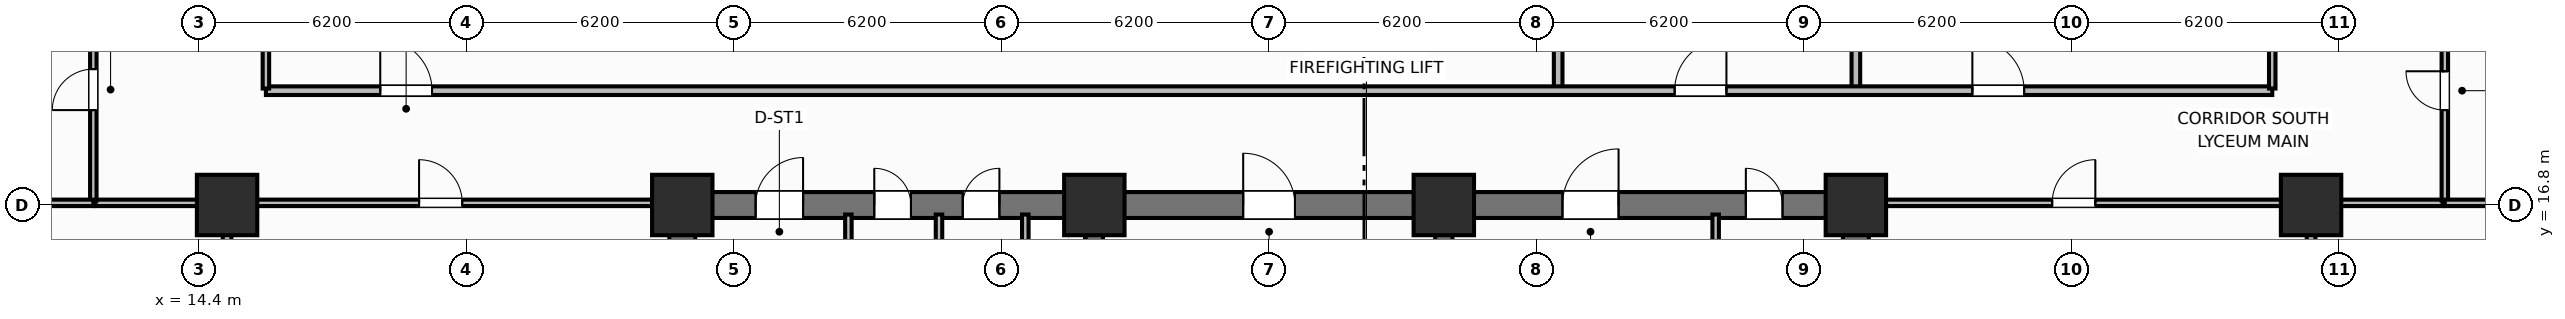
"""IFC4 building model, lengths in metres.
Left out: names, types, materials, properties, quantities, classifications, styles, units other than length and angle.
Written with IfcOpenShell. Run it as: python <this file> out.ifc"""

import sys

from ifc_helpers import new_model, si_unit, direction, frame, frame_2d, origin, origin_2d, place, context, subcontext, project, spatial, rectangle, extrude, element, fill, save


model = new_model("IFC4")
c1 = context("Model", 3, precision=1e-05, world=origin(), true_north=direction((0.0, 1.0)))
c2 = subcontext(c1, "Body", "Model", "MODEL_VIEW")
j1 = project(units=[si_unit("LENGTHUNIT", "METRE"), si_unit("PLANEANGLEUNIT", "RADIAN")], contexts=[c1])
p1 = place(None, origin())
s1 = spatial("IfcSite", under=j1, at=p1, CompositionType="ELEMENT")
p2 = place(p1, origin())
s2 = spatial("IfcBuilding", under=s1, at=p2, CompositionType="ELEMENT")
p3 = place(p2, frame((0.0, 0.0, 15.6)))
s3 = spatial("IfcBuildingStorey", under=s2, at=p3, CompositionType="ELEMENT", Elevation=15.6)
for number, where, z_axis, x_axis in (
    (1, (25.6, 10.9, 0.0), (0.0, 0.0, 1.0), (0.0, 1.0, 0.0)),
    (2, (52.8, 10.9, 0.0), (0.0, 0.0, 1.0), (0.0, 1.0, 0.0)),
):
    element("IfcWall", number, at=place(p3, frame(where, z_axis=z_axis, x_axis=x_axis)), inside=s3, PredefinedType="SHEAR", context=c2, shape_type="SweptSolid", body=[
        extrude(rectangle(XDim=5.6, YDim=0.6, at=frame_2d((2.8, 0.0))), origin(), (0.0, 0.0, 1.0), 4.5),
    ])
p4 = place(p3, frame((25.6, 16.8, 0.0), z_axis=(0.0, 0.0, 1.0), x_axis=(1.0, 0.0, 0.0)))
e3 = element("IfcWall", 3, at=p4, inside=s3, PredefinedType="SHEAR", context=c2, shape_type="SweptSolid", body=[
    extrude(rectangle(XDim=27.2, YDim=0.6, at=frame_2d((13.6, 0.0))), origin(), (0.0, 0.0, 1.0), 4.5),
])
p5 = place(p4, frame((1.7, 0.0, 0.0)))
e4 = element("IfcOpeningElement", 4, at=p5, cuts=e3, PredefinedType="OPENING", context=c2, shape_type="SweptSolid", body=[
    extrude(rectangle(XDim=1.1, YDim=2.15, at=frame_2d((0.55, 1.075))), frame((0.0, 0.31, 0.0), z_axis=(0.0, -1.0, 0.0), x_axis=(1.0, 0.0, 0.0)), (0.0, 0.0, 1.0), 0.62),
])
p6 = place(p4, frame((4.45, 0.0, 0.0)))
e5 = element("IfcOpeningElement", 5, at=p6, cuts=e3, PredefinedType="OPENING", context=c2, shape_type="SweptSolid", body=[
    extrude(rectangle(XDim=0.85, YDim=2.1, at=frame_2d((0.425, 1.05))), frame((0.0, 0.31, 0.0), z_axis=(0.0, -1.0, 0.0), x_axis=(1.0, 0.0, 0.0)), (0.0, 0.0, 1.0), 0.62),
])
p7 = place(p4, frame((6.5, 0.0, 0.0)))
e6 = element("IfcOpeningElement", 6, at=p7, cuts=e3, PredefinedType="OPENING", context=c2, shape_type="SweptSolid", body=[
    extrude(rectangle(XDim=0.85, YDim=2.1, at=frame_2d((0.425, 1.05))), frame((0.0, 0.31, 0.0), z_axis=(0.0, -1.0, 0.0), x_axis=(1.0, 0.0, 0.0)), (0.0, 0.0, 1.0), 0.62),
])
p8 = place(p4, frame((13.0, 0.0, 0.0)))
e7 = element("IfcOpeningElement", 7, at=p8, cuts=e3, PredefinedType="OPENING", context=c2, shape_type="SweptSolid", body=[
    extrude(rectangle(XDim=1.2, YDim=2.15, at=frame_2d((0.6, 1.075))), frame((0.0, 0.31, 0.0), z_axis=(0.0, -1.0, 0.0), x_axis=(1.0, 0.0, 0.0)), (0.0, 0.0, 1.0), 0.62),
])
p9 = place(p4, frame((20.4, 0.0, 0.0)))
e8 = element("IfcOpeningElement", 8, at=p9, cuts=e3, PredefinedType="OPENING", context=c2, shape_type="SweptSolid", body=[
    extrude(rectangle(XDim=1.3, YDim=2.2, at=frame_2d((0.65, 1.1))), frame((0.0, 0.31, 0.0), z_axis=(0.0, -1.0, 0.0), x_axis=(1.0, 0.0, 0.0)), (0.0, 0.0, 1.0), 0.62),
])
p10 = place(p4, frame((24.65, 0.0, 0.0)))
e9 = element("IfcOpeningElement", 9, at=p10, cuts=e3, PredefinedType="OPENING", context=c2, shape_type="SweptSolid", body=[
    extrude(rectangle(XDim=0.85, YDim=2.1, at=frame_2d((0.425, 1.05))), frame((0.0, 0.31, 0.0), z_axis=(0.0, -1.0, 0.0), x_axis=(1.0, 0.0, 0.0)), (0.0, 0.0, 1.0), 0.62),
])
for number, where, z_axis, x_axis in (
    (10, (35.15, 10.9, 0.0), (0.0, 0.0, 1.0), (0.0, 1.0, 0.0)),
    (11, (43.25, 10.9, 0.0), (0.0, 0.0, 1.0), (0.0, 1.0, 0.0)),
):
    element("IfcWall", number, at=place(p3, frame(where, z_axis=z_axis, x_axis=x_axis)), inside=s3, PredefinedType="SHEAR", context=c2, shape_type="SweptSolid", body=[
        extrude(rectangle(XDim=5.6, YDim=0.4, at=frame_2d((2.8, 0.0))), origin(), (0.0, 0.0, 1.0), 4.5),
    ])
for number, where, z_axis, x_axis in (
    (12, (25.6, 16.8, 0.0), (0.0, 0.0, 1.0), (1.0, 0.0, 0.0)),
    (13, (35.15, 16.8, 0.0), (0.0, 0.0, 1.0), (1.0, 0.0, 0.0)),
    (14, (43.25, 16.8, 0.0), (0.0, 0.0, 1.0), (1.0, 0.0, 0.0)),
    (15, (52.8, 16.8, 0.0), (0.0, 0.0, 1.0), (1.0, 0.0, 0.0)),
    (16, (15.05, 16.8, 0.0), (0.0, 0.0, 1.0), (1.0, 0.0, 0.0)),
    (17, (63.35, 16.8, 0.0), (0.0, 0.0, 1.0), (1.0, 0.0, 0.0)),
):
    element("IfcColumn", number, at=place(p3, frame(where, z_axis=z_axis, x_axis=x_axis)), inside=s3, PredefinedType="COLUMN", context=c2, shape_type="SweptSolid", body=[
        extrude(rectangle(XDim=1.4, YDim=1.4, at=origin_2d()), origin(), (0.0, 0.0, 1.0), 4.5),
    ])
for number, where, z_axis, x_axis in (
    (18, (29.45, 14.5, 0.0), (0.0, 0.0, 1.0), (0.0, 1.0, 0.0)),
    (19, (31.55, 14.5, 0.0), (0.0, 0.0, 1.0), (0.0, 1.0, 0.0)),
):
    element("IfcWall", number, at=place(p3, frame(where, z_axis=z_axis, x_axis=x_axis)), inside=s3, PredefinedType="PARTITIONING", context=c2, shape_type="SweptSolid", body=[
        extrude(rectangle(XDim=2.08, YDim=0.15, at=frame_2d((1.04, 0.0))), origin(), (0.0, 0.0, 1.0), 3.42),
    ])
p11 = place(p3, frame((33.55, 14.5, 0.0), z_axis=(0.0, 0.0, 1.0), x_axis=(0.0, 1.0, 0.0)))
e20 = element("IfcWall", 20, at=p11, inside=s3, PredefinedType="PARTITIONING", context=c2, shape_type="SweptSolid", body=[
    extrude(rectangle(XDim=2.08, YDim=0.15, at=frame_2d((1.04, 0.0))), origin(), (0.0, 0.0, 1.0), 3.42),
])
p12 = place(p11, frame((0.55, 0.0, 0.0)))
e21 = element("IfcOpeningElement", 21, at=p12, cuts=e20, PredefinedType="OPENING", context=c2, shape_type="SweptSolid", body=[
    extrude(rectangle(XDim=0.85, YDim=2.05, at=frame_2d((0.425, 1.025))), frame((0.0, 0.085, 0.0), z_axis=(0.0, -1.0, 0.0), x_axis=(1.0, 0.0, 0.0)), (0.0, 0.0, 1.0), 0.17),
])
p13 = place(p3, frame((49.55, 13.7, 0.0), z_axis=(0.0, 0.0, 1.0), x_axis=(0.0, 1.0, 0.0)))
e22 = element("IfcWall", 22, at=p13, inside=s3, PredefinedType="PARTITIONING", context=c2, shape_type="SweptSolid", body=[
    extrude(rectangle(XDim=2.88, YDim=0.15, at=frame_2d((1.44, 0.0))), origin(), (0.0, 0.0, 1.0), 3.42),
])
for number, where, z_axis, x_axis in (
    (23, (45.9, 19.5, 0.0), (0.0, 0.0, 1.0), (0.0, 1.0, 0.0)),
    (24, (52.8, 19.5, 0.0), (0.0, 0.0, 1.0), (0.0, 1.0, 0.0)),
):
    element("IfcWall", number, at=place(p3, frame(where, z_axis=z_axis, x_axis=x_axis)), inside=s3, PredefinedType="PARTITIONING", context=c2, shape_type="SweptSolid", body=[
        extrude(rectangle(XDim=17.4, YDim=0.2, at=frame_2d((8.7, 0.0))), origin(), (0.0, 0.0, 1.0), 3.42),
    ])
p14 = place(p3, frame((15.95, 19.45, 0.0), z_axis=(0.0, 0.0, 1.0), x_axis=(1.0, 0.0, 0.0)))
e25 = element("IfcWall", 25, at=p14, inside=s3, PredefinedType="PARTITIONING", context=c2, shape_type="SweptSolid", body=[
    extrude(rectangle(XDim=46.5, YDim=0.2, at=frame_2d((23.25, 0.0))), origin(), (0.0, 0.0, 1.0), 3.42),
])
p15 = place(p14, frame((2.65, 0.0, 0.0)))
e26 = element("IfcOpeningElement", 26, at=p15, cuts=e25, PredefinedType="OPENING", context=c2, shape_type="SweptSolid", body=[
    extrude(rectangle(XDim=1.2, YDim=2.15, at=frame_2d((0.6, 1.075))), frame((0.0, 0.11, 0.0), z_axis=(0.0, -1.0, 0.0), x_axis=(1.0, 0.0, 0.0)), (0.0, 0.0, 1.0), 0.22),
])
p16 = place(p14, frame((32.65, 0.0, 0.0)))
e27 = element("IfcOpeningElement", 27, at=p16, cuts=e25, PredefinedType="OPENING", context=c2, shape_type="SweptSolid", body=[
    extrude(rectangle(XDim=1.2, YDim=2.15, at=frame_2d((0.6, 1.075))), frame((0.0, 0.11, 0.0), z_axis=(0.0, -1.0, 0.0), x_axis=(1.0, 0.0, 0.0)), (0.0, 0.0, 1.0), 0.22),
])
p17 = place(p14, frame((39.55, 0.0, 0.0)))
e28 = element("IfcOpeningElement", 28, at=p17, cuts=e25, PredefinedType="OPENING", context=c2, shape_type="SweptSolid", body=[
    extrude(rectangle(XDim=1.2, YDim=2.15, at=frame_2d((0.6, 1.075))), frame((0.0, 0.11, 0.0), z_axis=(0.0, -1.0, 0.0), x_axis=(1.0, 0.0, 0.0)), (0.0, 0.0, 1.0), 0.22),
])
for number, where, z_axis, x_axis in (
    (29, (15.95, 19.5, 0.0), (0.0, 0.0, 1.0), (0.0, 1.0, 0.0)),
    (30, (62.45, 19.5, 0.0), (0.0, 0.0, 1.0), (0.0, 1.0, 0.0)),
):
    element("IfcWall", number, at=place(p3, frame(where, z_axis=z_axis, x_axis=x_axis)), inside=s3, PredefinedType="PARTITIONING", context=c2, shape_type="SweptSolid", body=[
        extrude(rectangle(XDim=17.4, YDim=0.15, at=frame_2d((8.7, 0.0))), origin(), (0.0, 0.0, 1.0), 3.42),
    ])
p18 = place(p3, frame((15.05, 0.4, 0.0), z_axis=(0.0, 0.0, 1.0), x_axis=(0.0, 1.0, 0.0)))
e31 = element("IfcWall", 31, at=p18, inside=s3, PredefinedType="PARTITIONING", context=c2, shape_type="SweptSolid", body=[
    extrude(rectangle(XDim=16.4, YDim=0.2, at=frame_2d((8.2, 0.0))), origin(), (0.0, 0.0, 1.0), 3.42),
])
p19 = place(p18, frame((5.5, 0.0, 0.0)))
e32 = element("IfcOpeningElement", 32, at=p19, cuts=e31, PredefinedType="OPENING", context=c2, shape_type="SweptSolid", body=[
    extrude(rectangle(XDim=1.0, YDim=2.15, at=frame_2d((0.5, 1.075))), frame((0.0, 0.11, 0.0), z_axis=(0.0, -1.0, 0.0), x_axis=(1.0, 0.0, 0.0)), (0.0, 0.0, 1.0), 0.22),
])
p20 = place(p3, frame((12.0, 16.85, 0.0), z_axis=(0.0, 0.0, 1.0), x_axis=(1.0, 0.0, 0.0)))
e33 = element("IfcWall", 33, at=p20, inside=s3, PredefinedType="PARTITIONING", context=c2, shape_type="SweptSolid", body=[
    extrude(rectangle(XDim=13.25, YDim=0.15, at=frame_2d((6.625, 0.0))), origin(), (0.0, 0.0, 1.0), 3.42),
])
p21 = place(p20, frame((7.5, 0.0, 0.0)))
e34 = element("IfcOpeningElement", 34, at=p21, cuts=e33, PredefinedType="OPENING", context=c2, shape_type="SweptSolid", body=[
    extrude(rectangle(XDim=1.0, YDim=2.15, at=frame_2d((0.5, 1.075))), frame((0.0, 0.085, 0.0), z_axis=(0.0, -1.0, 0.0), x_axis=(1.0, 0.0, 0.0)), (0.0, 0.0, 1.0), 0.17),
])
p22 = place(p3, frame((11.95, 16.9, 0.0), z_axis=(0.0, 0.0, 1.0), x_axis=(0.0, 1.0, 0.0)))
e35 = element("IfcWall", 35, at=p22, inside=s3, PredefinedType="PARTITIONING", context=c2, shape_type="SweptSolid", body=[
    extrude(rectangle(XDim=5.65, YDim=0.15, at=frame_2d((2.825, 0.0))), origin(), (0.0, 0.0, 1.0), 3.42),
])
p23 = place(p22, frame((2.1, 0.0, 0.0)))
e36 = element("IfcOpeningElement", 36, at=p23, cuts=e35, PredefinedType="OPENING", context=c2, shape_type="SweptSolid", body=[
    extrude(rectangle(XDim=0.95, YDim=2.1, at=frame_2d((0.475, 1.05))), frame((0.0, 0.085, 0.0), z_axis=(0.0, -1.0, 0.0), x_axis=(1.0, 0.0, 0.0)), (0.0, 0.0, 1.0), 0.17),
])
p24 = place(p3, frame((0.4, 16.85, 0.0), z_axis=(0.0, 0.0, 1.0), x_axis=(1.0, 0.0, 0.0)))
e37 = element("IfcWall", 37, at=p24, inside=s3, PredefinedType="PARTITIONING", context=c2, shape_type="SweptSolid", body=[
    extrude(rectangle(XDim=11.55, YDim=0.15, at=frame_2d((5.775, 0.0))), origin(), (0.0, 0.0, 1.0), 3.42),
])
p25 = place(p3, frame((63.35, 0.4, 0.0), z_axis=(0.0, 0.0, 1.0), x_axis=(0.0, 1.0, 0.0)))
e38 = element("IfcWall", 38, at=p25, inside=s3, PredefinedType="PARTITIONING", context=c2, shape_type="SweptSolid", body=[
    extrude(rectangle(XDim=16.4, YDim=0.2, at=frame_2d((8.2, 0.0))), origin(), (0.0, 0.0, 1.0), 3.42),
])
p26 = place(p25, frame((5.5, 0.0, 0.0)))
e39 = element("IfcOpeningElement", 39, at=p26, cuts=e38, PredefinedType="OPENING", context=c2, shape_type="SweptSolid", body=[
    extrude(rectangle(XDim=1.0, YDim=2.15, at=frame_2d((0.5, 1.075))), frame((0.0, 0.11, 0.0), z_axis=(0.0, -1.0, 0.0), x_axis=(1.0, 0.0, 0.0)), (0.0, 0.0, 1.0), 0.22),
])
p27 = place(p3, frame((53.15, 16.85, 0.0), z_axis=(0.0, 0.0, 1.0), x_axis=(1.0, 0.0, 0.0)))
e40 = element("IfcWall", 40, at=p27, inside=s3, PredefinedType="PARTITIONING", context=c2, shape_type="SweptSolid", body=[
    extrude(rectangle(XDim=13.25, YDim=0.15, at=frame_2d((6.625, 0.0))), origin(), (0.0, 0.0, 1.0), 3.42),
])
p28 = place(p27, frame((4.2, 0.0, 0.0)))
e41 = element("IfcOpeningElement", 41, at=p28, cuts=e40, PredefinedType="OPENING", context=c2, shape_type="SweptSolid", body=[
    extrude(rectangle(XDim=1.0, YDim=2.15, at=frame_2d((0.5, 1.075))), frame((0.0, 0.085, 0.0), z_axis=(0.0, -1.0, 0.0), x_axis=(1.0, 0.0, 0.0)), (0.0, 0.0, 1.0), 0.17),
])
p29 = place(p3, frame((66.45, 16.9, 0.0), z_axis=(0.0, 0.0, 1.0), x_axis=(0.0, 1.0, 0.0)))
e42 = element("IfcWall", 42, at=p29, inside=s3, PredefinedType="PARTITIONING", context=c2, shape_type="SweptSolid", body=[
    extrude(rectangle(XDim=5.65, YDim=0.15, at=frame_2d((2.825, 0.0))), origin(), (0.0, 0.0, 1.0), 3.42),
])
p30 = place(p29, frame((2.1, 0.0, 0.0)))
e43 = element("IfcOpeningElement", 43, at=p30, cuts=e42, PredefinedType="OPENING", context=c2, shape_type="SweptSolid", body=[
    extrude(rectangle(XDim=0.9, YDim=2.1, at=frame_2d((0.45, 1.05))), frame((0.0, 0.085, 0.0), z_axis=(0.0, -1.0, 0.0), x_axis=(1.0, 0.0, 0.0)), (0.0, 0.0, 1.0), 0.17),
])
p31 = place(p3, frame((66.45, 16.85, 0.0), z_axis=(0.0, 0.0, 1.0), x_axis=(1.0, 0.0, 0.0)))
e44 = element("IfcWall", 44, at=p31, inside=s3, PredefinedType="PARTITIONING", context=c2, shape_type="SweptSolid", body=[
    extrude(rectangle(XDim=11.55, YDim=0.15, at=frame_2d((5.775, 0.0))), origin(), (0.0, 0.0, 1.0), 3.42),
])
p32 = place(p15, origin())
e45 = element("IfcDoor", 45, at=p32, inside=s3, OperationType="SINGLE_SWING_LEFT", PredefinedType="DOOR", context=c2, shape_type="SweptSolid", body=[
    extrude(rectangle(XDim=1.2, YDim=2.15, at=frame_2d((0.6, 1.075))), frame((0.0, 0.025, 0.0), z_axis=(0.0, -1.0, 0.0), x_axis=(1.0, 0.0, 0.0)), (0.0, 0.0, 1.0), 0.05),
])
fill(e26, e45)
p33 = place(p16, origin())
e46 = element("IfcDoor", 46, at=p33, inside=s3, OperationType="SINGLE_SWING_RIGHT", PredefinedType="DOOR", context=c2, shape_type="SweptSolid", body=[
    extrude(rectangle(XDim=1.2, YDim=2.15, at=frame_2d((0.6, 1.075))), frame((0.0, 0.025, 0.0), z_axis=(0.0, -1.0, 0.0), x_axis=(1.0, 0.0, 0.0)), (0.0, 0.0, 1.0), 0.05),
])
fill(e27, e46)
p34 = place(p17, origin())
e47 = element("IfcDoor", 47, at=p34, inside=s3, OperationType="SINGLE_SWING_LEFT", PredefinedType="DOOR", context=c2, shape_type="SweptSolid", body=[
    extrude(rectangle(XDim=1.2, YDim=2.15, at=frame_2d((0.6, 1.075))), frame((0.0, 0.025, 0.0), z_axis=(0.0, -1.0, 0.0), x_axis=(1.0, 0.0, 0.0)), (0.0, 0.0, 1.0), 0.05),
])
fill(e28, e47)
p35 = place(p21, origin())
e48 = element("IfcDoor", 48, at=p35, inside=s3, OperationType="SINGLE_SWING_LEFT", PredefinedType="DOOR", context=c2, shape_type="SweptSolid", body=[
    extrude(rectangle(XDim=1.0, YDim=2.15, at=frame_2d((0.5, 1.075))), frame((0.0, 0.025, 0.0), z_axis=(0.0, -1.0, 0.0), x_axis=(1.0, 0.0, 0.0)), (0.0, 0.0, 1.0), 0.05),
])
fill(e34, e48)
p36 = place(p23, origin())
e49 = element("IfcDoor", 49, at=p36, inside=s3, OperationType="SINGLE_SWING_LEFT", PredefinedType="DOOR", context=c2, shape_type="SweptSolid", body=[
    extrude(rectangle(XDim=0.95, YDim=2.1, at=frame_2d((0.475, 1.05))), frame((0.0, 0.025, 0.0), z_axis=(0.0, -1.0, 0.0), x_axis=(1.0, 0.0, 0.0)), (0.0, 0.0, 1.0), 0.05),
])
fill(e36, e49)
p37 = place(p28, origin())
e50 = element("IfcDoor", 50, at=p37, inside=s3, OperationType="SINGLE_SWING_RIGHT", PredefinedType="DOOR", context=c2, shape_type="SweptSolid", body=[
    extrude(rectangle(XDim=1.0, YDim=2.15, at=frame_2d((0.5, 1.075))), frame((0.0, 0.025, 0.0), z_axis=(0.0, -1.0, 0.0), x_axis=(1.0, 0.0, 0.0)), (0.0, 0.0, 1.0), 0.05),
])
fill(e41, e50)
p38 = place(p30, origin())
e51 = element("IfcDoor", 51, at=p38, inside=s3, OperationType="SINGLE_SWING_RIGHT", PredefinedType="DOOR", context=c2, shape_type="SweptSolid", body=[
    extrude(rectangle(XDim=0.9, YDim=2.1, at=frame_2d((0.45, 1.05))), frame((0.0, 0.025, 0.0), z_axis=(0.0, -1.0, 0.0), x_axis=(1.0, 0.0, 0.0)), (0.0, 0.0, 1.0), 0.05),
])
fill(e43, e51)
p39 = place(p5, origin())
e52 = element("IfcDoor", 52, at=p39, inside=s3, OperationType="SINGLE_SWING_RIGHT", PredefinedType="DOOR", context=c2, shape_type="SweptSolid", body=[
    extrude(rectangle(XDim=1.1, YDim=2.15, at=frame_2d((0.55, 1.075))), frame((0.0, 0.025, 0.0), z_axis=(0.0, -1.0, 0.0), x_axis=(1.0, 0.0, 0.0)), (0.0, 0.0, 1.0), 0.05),
])
fill(e4, e52)
p40 = place(p6, origin())
e53 = element("IfcDoor", 53, at=p40, inside=s3, OperationType="SINGLE_SWING_LEFT", PredefinedType="DOOR", context=c2, shape_type="SweptSolid", body=[
    extrude(rectangle(XDim=0.85, YDim=2.1, at=frame_2d((0.425, 1.05))), frame((0.0, 0.025, 0.0), z_axis=(0.0, -1.0, 0.0), x_axis=(1.0, 0.0, 0.0)), (0.0, 0.0, 1.0), 0.05),
])
fill(e5, e53)
p41 = place(p7, origin())
e54 = element("IfcDoor", 54, at=p41, inside=s3, OperationType="SINGLE_SWING_RIGHT", PredefinedType="DOOR", context=c2, shape_type="SweptSolid", body=[
    extrude(rectangle(XDim=0.85, YDim=2.1, at=frame_2d((0.425, 1.05))), frame((0.0, 0.025, 0.0), z_axis=(0.0, -1.0, 0.0), x_axis=(1.0, 0.0, 0.0)), (0.0, 0.0, 1.0), 0.05),
])
fill(e6, e54)
p42 = place(p8, origin())
e55 = element("IfcDoor", 55, at=p42, inside=s3, OperationType="SINGLE_SWING_LEFT", PredefinedType="DOOR", context=c2, shape_type="SweptSolid", body=[
    extrude(rectangle(XDim=1.2, YDim=2.15, at=frame_2d((0.6, 1.075))), frame((0.0, 0.025, 0.0), z_axis=(0.0, -1.0, 0.0), x_axis=(1.0, 0.0, 0.0)), (0.0, 0.0, 1.0), 0.05),
])
fill(e7, e55)
p43 = place(p9, origin())
e56 = element("IfcDoor", 56, at=p43, inside=s3, OperationType="SINGLE_SWING_RIGHT", PredefinedType="DOOR", context=c2, shape_type="SweptSolid", body=[
    extrude(rectangle(XDim=1.3, YDim=2.2, at=frame_2d((0.65, 1.1))), frame((0.0, 0.025, 0.0), z_axis=(0.0, -1.0, 0.0), x_axis=(1.0, 0.0, 0.0)), (0.0, 0.0, 1.0), 0.05),
])
fill(e8, e56)
p44 = place(p10, origin())
e57 = element("IfcDoor", 57, at=p44, inside=s3, OperationType="SINGLE_SWING_LEFT", PredefinedType="DOOR", context=c2, shape_type="SweptSolid", body=[
    extrude(rectangle(XDim=0.85, YDim=2.1, at=frame_2d((0.425, 1.05))), frame((0.0, 0.025, 0.0), z_axis=(0.0, -1.0, 0.0), x_axis=(1.0, 0.0, 0.0)), (0.0, 0.0, 1.0), 0.05),
])
fill(e9, e57)
save(model, sys.argv[1])
